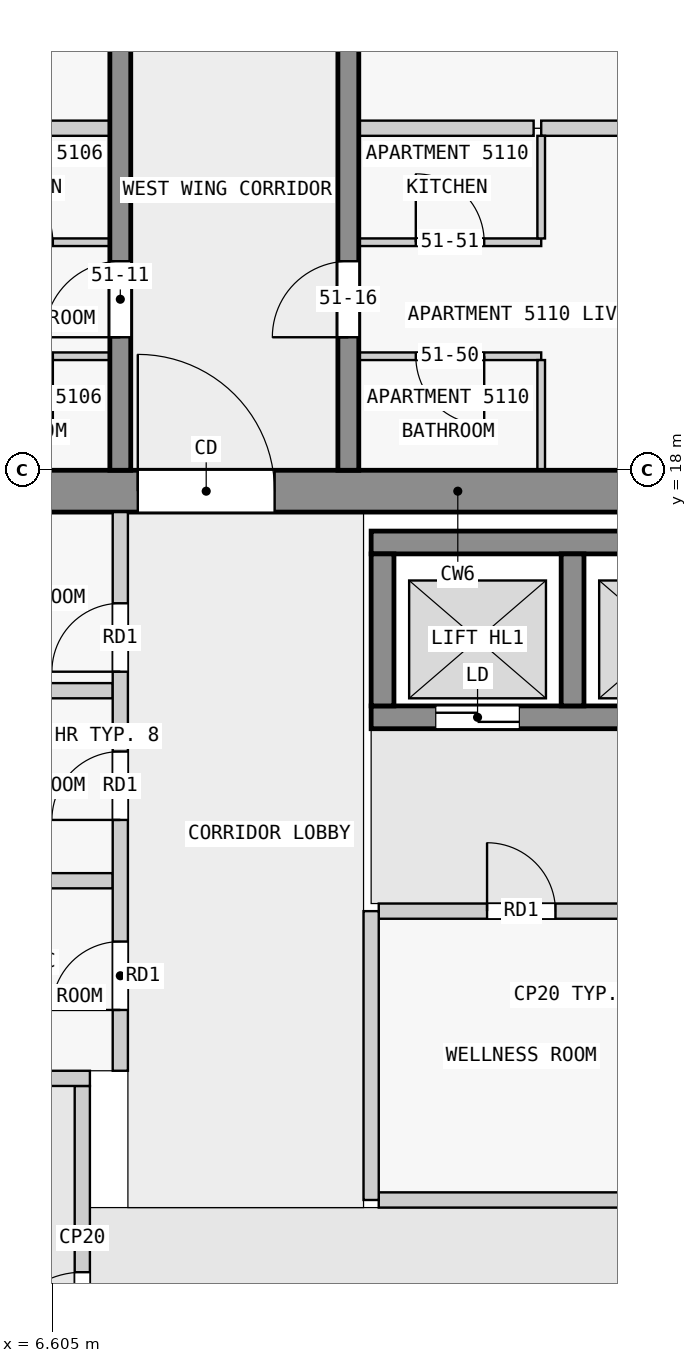
"""IFC4 building model, lengths in metres.
Left out: names, types, materials, properties, quantities, classifications, styles, units other than length and angle.
Written with IfcOpenShell. Run it as: python <this file> out.ifc"""

import sys

from ifc_helpers import new_model, si_unit, direction, frame, frame_2d, origin, place, context, subcontext, project, spatial, rectangle, extrude, element, fill, save


model = new_model("IFC4")
c1 = context("Model", 3, precision=1e-05, world=origin(), true_north=direction((0.0, 1.0)))
c2 = subcontext(c1, "Body", "Model", "MODEL_VIEW")
j1 = project(units=[si_unit("LENGTHUNIT", "METRE"), si_unit("PLANEANGLEUNIT", "RADIAN")], contexts=[c1])
p1 = place(None, origin())
s1 = spatial("IfcSite", under=j1, at=p1, CompositionType="ELEMENT")
p2 = place(p1, origin())
s2 = spatial("IfcBuilding", under=s1, at=p2, CompositionType="ELEMENT")
p3 = place(p2, frame((0.0, 0.0, 197.9)))
s3 = spatial("IfcBuildingStorey", under=s2, at=p3, CompositionType="ELEMENT", Elevation=197.9)
p4 = place(p3, frame((1.38, 17.725, 0.0), z_axis=(0.0, 0.0, 1.0), x_axis=(1.0, 0.0, 0.0)))
e1 = element("IfcWall", 1, at=p4, inside=s3, PredefinedType="SHEAR", context=c2, shape_type="SweptSolid", body=[
    extrude(rectangle(XDim=21.12, YDim=0.55, at=frame_2d((10.56, 0.0))), origin(), (0.0, 0.0, 1.0), 3.25),
])
p5 = place(p4, frame((6.35, 0.0, 0.0)))
e2 = element("IfcOpeningElement", 2, at=p5, cuts=e1, PredefinedType="OPENING", context=c2, shape_type="SweptSolid", body=[
    extrude(rectangle(XDim=1.8, YDim=2.1, at=frame_2d((0.9, 1.05))), frame((0.0, 0.285, 0.0), z_axis=(0.0, -1.0, 0.0), x_axis=(1.0, 0.0, 0.0)), (0.0, 0.0, 1.0), 0.57),
])
p6 = place(p3, frame((10.8, 17.05, 0.0), z_axis=(0.0, 0.0, 1.0), x_axis=(1.0, 0.0, 0.0)))
e3 = element("IfcWall", 3, at=p6, inside=s3, PredefinedType="SHEAR", context=c2, shape_type="SweptSolid", body=[
    extrude(rectangle(XDim=7.8, YDim=0.3, at=frame_2d((3.9, 0.0))), origin(), (0.0, 0.0, 1.0), 3.25),
])
p7 = place(p3, frame((10.8, 14.75, 0.0), z_axis=(0.0, 0.0, 1.0), x_axis=(1.0, 0.0, 0.0)))
e4 = element("IfcWall", 4, at=p7, inside=s3, PredefinedType="SHEAR", context=c2, shape_type="SweptSolid", body=[
    extrude(rectangle(XDim=7.8, YDim=0.3, at=frame_2d((3.9, 0.0))), origin(), (0.0, 0.0, 1.0), 3.25),
])
p8 = place(p7, frame((0.85, 0.0, 0.0)))
e5 = element("IfcOpeningElement", 5, at=p8, cuts=e4, PredefinedType="OPENING", context=c2, shape_type="SweptSolid", body=[
    extrude(rectangle(XDim=1.1, YDim=2.1, at=frame_2d((0.55, 1.05))), frame((0.0, 0.16, 0.0), z_axis=(0.0, -1.0, 0.0), x_axis=(1.0, 0.0, 0.0)), (0.0, 0.0, 1.0), 0.32),
])
p9 = place(p7, frame((3.35, 0.0, 0.0)))
e6 = element("IfcOpeningElement", 6, at=p9, cuts=e4, PredefinedType="OPENING", context=c2, shape_type="SweptSolid", body=[
    extrude(rectangle(XDim=1.1, YDim=2.1, at=frame_2d((0.55, 1.05))), frame((0.0, 0.16, 0.0), z_axis=(0.0, -1.0, 0.0), x_axis=(1.0, 0.0, 0.0)), (0.0, 0.0, 1.0), 0.32),
])
p10 = place(p7, frame((5.85, 0.0, 0.0)))
e7 = element("IfcOpeningElement", 7, at=p10, cuts=e4, PredefinedType="OPENING", context=c2, shape_type="SweptSolid", body=[
    extrude(rectangle(XDim=1.1, YDim=2.1, at=frame_2d((0.55, 1.05))), frame((0.0, 0.16, 0.0), z_axis=(0.0, -1.0, 0.0), x_axis=(1.0, 0.0, 0.0)), (0.0, 0.0, 1.0), 0.32),
])
for number, where, z_axis, x_axis in (
    (8, (10.95, 14.9, 0.0), (0.0, 0.0, 1.0), (0.0, 1.0, 0.0)),
    (9, (13.45, 14.9, 0.0), (0.0, 0.0, 1.0), (0.0, 1.0, 0.0)),
):
    element("IfcWall", number, at=place(p3, frame(where, z_axis=z_axis, x_axis=x_axis)), inside=s3, PredefinedType="SHEAR", context=c2, shape_type="SweptSolid", body=[
        extrude(rectangle(XDim=2.0, YDim=0.3, at=frame_2d((1.0, 0.0))), origin(), (0.0, 0.0, 1.0), 3.25),
    ])
p11 = place(p3, frame((7.5, 18.0, 0.0), z_axis=(0.0, 0.0, 1.0), x_axis=(0.0, 1.0, 0.0)))
e10 = element("IfcWall", 10, at=p11, inside=s3, PredefinedType="SHEAR", context=c2, shape_type="SweptSolid", body=[
    extrude(rectangle(XDim=27.0, YDim=0.275, at=frame_2d((13.5, 0.0))), origin(), (0.0, 0.0, 1.0), 3.25),
])
p12 = place(p11, frame((1.75, 0.0, 0.0)))
e11 = element("IfcOpeningElement", 11, at=p12, cuts=e10, PredefinedType="OPENING", context=c2, shape_type="SweptSolid", body=[
    extrude(rectangle(XDim=1.0, YDim=2.1, at=frame_2d((0.5, 1.05))), frame((0.0, 0.147, 0.0), z_axis=(0.0, -1.0, 0.0), x_axis=(1.0, 0.0, 0.0)), (0.0, 0.0, 1.0), 0.295),
])
p13 = place(p11, frame((5.85, 0.0, 0.0)))
e12 = element("IfcOpeningElement", 12, at=p13, cuts=e10, PredefinedType="OPENING", context=c2, shape_type="SweptSolid", body=[
    extrude(rectangle(XDim=1.8, YDim=2.1, at=frame_2d((0.9, 1.05))), frame((0.0, 0.147, 0.0), z_axis=(0.0, -1.0, 0.0), x_axis=(1.0, 0.0, 0.0)), (0.0, 0.0, 1.0), 0.295),
])
p14 = place(p11, frame((10.75, 0.0, 0.0)))
e13 = element("IfcOpeningElement", 13, at=p14, cuts=e10, PredefinedType="OPENING", context=c2, shape_type="SweptSolid", body=[
    extrude(rectangle(XDim=1.0, YDim=2.1, at=frame_2d((0.5, 1.05))), frame((0.0, 0.147, 0.0), z_axis=(0.0, -1.0, 0.0), x_axis=(1.0, 0.0, 0.0)), (0.0, 0.0, 1.0), 0.295),
])
p15 = place(p11, frame((15.25, 0.0, 0.0)))
e14 = element("IfcOpeningElement", 14, at=p15, cuts=e10, PredefinedType="OPENING", context=c2, shape_type="SweptSolid", body=[
    extrude(rectangle(XDim=1.0, YDim=2.1, at=frame_2d((0.5, 1.05))), frame((0.0, 0.147, 0.0), z_axis=(0.0, -1.0, 0.0), x_axis=(1.0, 0.0, 0.0)), (0.0, 0.0, 1.0), 0.295),
])
p16 = place(p11, frame((21.35, 0.0, 0.0)))
e15 = element("IfcOpeningElement", 15, at=p16, cuts=e10, PredefinedType="OPENING", context=c2, shape_type="SweptSolid", body=[
    extrude(rectangle(XDim=1.0, YDim=2.1, at=frame_2d((0.5, 1.05))), frame((0.0, 0.147, 0.0), z_axis=(0.0, -1.0, 0.0), x_axis=(1.0, 0.0, 0.0)), (0.0, 0.0, 1.0), 0.295),
])
p17 = place(p3, frame((10.5, 18.0, 0.0), z_axis=(0.0, 0.0, 1.0), x_axis=(0.0, 1.0, 0.0)))
e16 = element("IfcWall", 16, at=p17, inside=s3, PredefinedType="SHEAR", context=c2, shape_type="SweptSolid", body=[
    extrude(rectangle(XDim=27.0, YDim=0.275, at=frame_2d((13.5, 0.0))), origin(), (0.0, 0.0, 1.0), 3.25),
])
p18 = place(p17, frame((1.75, 0.0, 0.0)))
e17 = element("IfcOpeningElement", 17, at=p18, cuts=e16, PredefinedType="OPENING", context=c2, shape_type="SweptSolid", body=[
    extrude(rectangle(XDim=1.0, YDim=2.1, at=frame_2d((0.5, 1.05))), frame((0.0, 0.147, 0.0), z_axis=(0.0, -1.0, 0.0), x_axis=(1.0, 0.0, 0.0)), (0.0, 0.0, 1.0), 0.295),
])
p19 = place(p17, frame((6.25, 0.0, 0.0)))
e18 = element("IfcOpeningElement", 18, at=p19, cuts=e16, PredefinedType="OPENING", context=c2, shape_type="SweptSolid", body=[
    extrude(rectangle(XDim=1.0, YDim=2.1, at=frame_2d((0.5, 1.05))), frame((0.0, 0.147, 0.0), z_axis=(0.0, -1.0, 0.0), x_axis=(1.0, 0.0, 0.0)), (0.0, 0.0, 1.0), 0.295),
])
p20 = place(p17, frame((15.25, 0.0, 0.0)))
e19 = element("IfcOpeningElement", 19, at=p20, cuts=e16, PredefinedType="OPENING", context=c2, shape_type="SweptSolid", body=[
    extrude(rectangle(XDim=1.0, YDim=2.1, at=frame_2d((0.5, 1.05))), frame((0.0, 0.147, 0.0), z_axis=(0.0, -1.0, 0.0), x_axis=(1.0, 0.0, 0.0)), (0.0, 0.0, 1.0), 0.295),
])
p21 = place(p17, frame((19.75, 0.0, 0.0)))
e20 = element("IfcOpeningElement", 20, at=p21, cuts=e16, PredefinedType="OPENING", context=c2, shape_type="SweptSolid", body=[
    extrude(rectangle(XDim=1.0, YDim=2.1, at=frame_2d((0.5, 1.05))), frame((0.0, 0.147, 0.0), z_axis=(0.0, -1.0, 0.0), x_axis=(1.0, 0.0, 0.0)), (0.0, 0.0, 1.0), 0.295),
])
p22 = place(p17, frame((23.25, 0.0, 0.0)))
e21 = element("IfcOpeningElement", 21, at=p22, cuts=e16, PredefinedType="OPENING", context=c2, shape_type="SweptSolid", body=[
    extrude(rectangle(XDim=0.9, YDim=2.1, at=frame_2d((0.45, 1.05))), frame((0.0, 0.147, 0.0), z_axis=(0.0, -1.0, 0.0), x_axis=(1.0, 0.0, 0.0)), (0.0, 0.0, 1.0), 0.295),
])
p23 = place(p17, frame((25.45, 0.0, 0.0)))
e22 = element("IfcOpeningElement", 22, at=p23, cuts=e16, PredefinedType="OPENING", context=c2, shape_type="SweptSolid", body=[
    extrude(rectangle(XDim=1.0, YDim=2.1, at=frame_2d((0.5, 1.05))), frame((0.0, 0.147, 0.0), z_axis=(0.0, -1.0, 0.0), x_axis=(1.0, 0.0, 0.0)), (0.0, 0.0, 1.0), 0.295),
])
p24 = place(p3, frame((7.0, 5.9, 0.0), z_axis=(0.0, 0.0, 1.0), x_axis=(0.0, 1.0, 0.0)))
e23 = element("IfcWall", 23, at=p24, inside=s3, PredefinedType="PARTITIONING", context=c2, shape_type="SweptSolid", body=[
    extrude(rectangle(XDim=4.0, YDim=0.2, at=frame_2d((2.0, 0.0))), origin(), (0.0, 0.0, 1.0), 3.25),
])
p25 = place(p24, frame((0.45, 0.0, 0.0)))
e24 = element("IfcOpeningElement", 24, at=p25, cuts=e23, PredefinedType="OPENING", context=c2, shape_type="SweptSolid", body=[
    extrude(rectangle(XDim=1.1, YDim=2.1, at=frame_2d((0.55, 1.05))), frame((0.0, 0.11, 0.0), z_axis=(0.0, -1.0, 0.0), x_axis=(1.0, 0.0, 0.0)), (0.0, 0.0, 1.0), 0.22),
])
p26 = place(p3, frame((5.15, 10.0, 0.0), z_axis=(0.0, 0.0, 1.0), x_axis=(1.0, 0.0, 0.0)))
e25 = element("IfcWall", 25, at=p26, inside=s3, PredefinedType="PARTITIONING", context=c2, shape_type="SweptSolid", body=[
    extrude(rectangle(XDim=1.95, YDim=0.2, at=frame_2d((0.975, 0.0))), origin(), (0.0, 0.0, 1.0), 3.25),
])
p27 = place(p3, frame((10.8, 8.4, 0.0), z_axis=(0.0, 0.0, 1.0), x_axis=(0.0, 1.0, 0.0)))
e26 = element("IfcWall", 26, at=p27, inside=s3, PredefinedType="PARTITIONING", context=c2, shape_type="SweptSolid", body=[
    extrude(rectangle(XDim=3.8, YDim=0.2, at=frame_2d((1.9, 0.0))), origin(), (0.0, 0.0, 1.0), 3.25),
])
p28 = place(p3, frame((10.9, 8.4, 0.0), z_axis=(0.0, 0.0, 1.0), x_axis=(1.0, 0.0, 0.0)))
e27 = element("IfcWall", 27, at=p28, inside=s3, PredefinedType="PARTITIONING", context=c2, shape_type="SweptSolid", body=[
    extrude(rectangle(XDim=8.55, YDim=0.2, at=frame_2d((4.275, 0.0))), origin(), (0.0, 0.0, 1.0), 3.25),
])
p29 = place(p3, frame((10.9, 12.2, 0.0), z_axis=(0.0, 0.0, 1.0), x_axis=(1.0, 0.0, 0.0)))
e28 = element("IfcWall", 28, at=p29, inside=s3, PredefinedType="PARTITIONING", context=c2, shape_type="SweptSolid", body=[
    extrude(rectangle(XDim=8.55, YDim=0.2, at=frame_2d((4.275, 0.0))), origin(), (0.0, 0.0, 1.0), 3.25),
])
p30 = place(p29, frame((1.425, 0.0, 0.0)))
e29 = element("IfcOpeningElement", 29, at=p30, cuts=e28, PredefinedType="OPENING", context=c2, shape_type="SweptSolid", body=[
    extrude(rectangle(XDim=0.9, YDim=2.1, at=frame_2d((0.45, 1.05))), frame((0.0, 0.11, 0.0), z_axis=(0.0, -1.0, 0.0), x_axis=(1.0, 0.0, 0.0)), (0.0, 0.0, 1.0), 0.22),
])
p31 = place(p29, frame((5.8, 0.0, 0.0)))
e30 = element("IfcOpeningElement", 30, at=p31, cuts=e28, PredefinedType="OPENING", context=c2, shape_type="SweptSolid", body=[
    extrude(rectangle(XDim=0.9, YDim=2.1, at=frame_2d((0.45, 1.05))), frame((0.0, 0.11, 0.0), z_axis=(0.0, -1.0, 0.0), x_axis=(1.0, 0.0, 0.0)), (0.0, 0.0, 1.0), 0.22),
])
p32 = place(p3, frame((7.5, 10.1, 0.0), z_axis=(0.0, 0.0, 1.0), x_axis=(0.0, 1.0, 0.0)))
e31 = element("IfcWall", 31, at=p32, inside=s3, PredefinedType="PARTITIONING", context=c2, shape_type="SweptSolid", body=[
    extrude(rectangle(XDim=7.35, YDim=0.2, at=frame_2d((3.675, 0.0))), origin(), (0.0, 0.0, 1.0), 3.25),
])
p33 = place(p32, frame((0.8, 0.0, 0.0)))
e32 = element("IfcOpeningElement", 32, at=p33, cuts=e31, PredefinedType="OPENING", context=c2, shape_type="SweptSolid", body=[
    extrude(rectangle(XDim=0.9, YDim=2.1, at=frame_2d((0.45, 1.05))), frame((0.0, 0.11, 0.0), z_axis=(0.0, -1.0, 0.0), x_axis=(1.0, 0.0, 0.0)), (0.0, 0.0, 1.0), 0.22),
])
p34 = place(p32, frame((3.3, 0.0, 0.0)))
e33 = element("IfcOpeningElement", 33, at=p34, cuts=e31, PredefinedType="OPENING", context=c2, shape_type="SweptSolid", body=[
    extrude(rectangle(XDim=0.9, YDim=2.1, at=frame_2d((0.45, 1.05))), frame((0.0, 0.11, 0.0), z_axis=(0.0, -1.0, 0.0), x_axis=(1.0, 0.0, 0.0)), (0.0, 0.0, 1.0), 0.22),
])
p35 = place(p32, frame((5.25, 0.0, 0.0)))
e34 = element("IfcOpeningElement", 34, at=p35, cuts=e31, PredefinedType="OPENING", context=c2, shape_type="SweptSolid", body=[
    extrude(rectangle(XDim=0.9, YDim=2.1, at=frame_2d((0.45, 1.05))), frame((0.0, 0.11, 0.0), z_axis=(0.0, -1.0, 0.0), x_axis=(1.0, 0.0, 0.0)), (0.0, 0.0, 1.0), 0.22),
])
for number, where, z_axis, x_axis in (
    (35, (5.15, 12.6, 0.0), (0.0, 0.0, 1.0), (1.0, 0.0, 0.0)),
    (36, (5.15, 15.1, 0.0), (0.0, 0.0, 1.0), (1.0, 0.0, 0.0)),
):
    element("IfcWall", number, at=place(p3, frame(where, z_axis=z_axis, x_axis=x_axis)), inside=s3, PredefinedType="PARTITIONING", context=c2, shape_type="SweptSolid", body=[
        extrude(rectangle(XDim=2.25, YDim=0.2, at=frame_2d((1.125, 0.0))), origin(), (0.0, 0.0, 1.0), 3.25),
    ])
p36 = place(p3, frame((7.363, 19.5, 0.0), z_axis=(0.0, 0.0, 1.0), x_axis=(-1.0, 0.0, 0.0)))
e37 = element("IfcWall", 37, at=p36, inside=s3, PredefinedType="PARTITIONING", context=c2, shape_type="SweptSolid", body=[
    extrude(rectangle(XDim=2.4, YDim=0.1, at=frame_2d((1.2, 0.0))), origin(), (0.0, 0.0, 1.0), 3.25),
])
p37 = place(p36, frame((0.75, 0.0, 0.0)))
e38 = element("IfcOpeningElement", 38, at=p37, cuts=e37, PredefinedType="OPENING", context=c2, shape_type="SweptSolid", body=[
    extrude(rectangle(XDim=0.9, YDim=2.1, at=frame_2d((0.45, 1.05))), frame((0.0, 0.06, 0.0), z_axis=(0.0, -1.0, 0.0), x_axis=(1.0, 0.0, 0.0)), (0.0, 0.0, 1.0), 0.12),
])
p38 = place(p3, frame((13.038, 19.5, 0.0), z_axis=(0.0, 0.0, 1.0), x_axis=(-1.0, 0.0, 0.0)))
e39 = element("IfcWall", 39, at=p38, inside=s3, PredefinedType="PARTITIONING", context=c2, shape_type="SweptSolid", body=[
    extrude(rectangle(XDim=2.4, YDim=0.1, at=frame_2d((1.2, 0.0))), origin(), (0.0, 0.0, 1.0), 3.25),
])
p39 = place(p38, frame((0.75, 0.0, 0.0)))
e40 = element("IfcOpeningElement", 40, at=p39, cuts=e39, PredefinedType="OPENING", context=c2, shape_type="SweptSolid", body=[
    extrude(rectangle(XDim=0.9, YDim=2.1, at=frame_2d((0.45, 1.05))), frame((0.0, 0.06, 0.0), z_axis=(0.0, -1.0, 0.0), x_axis=(1.0, 0.0, 0.0)), (0.0, 0.0, 1.0), 0.12),
])
p40 = place(p3, frame((4.962, 21.0, 0.0), z_axis=(0.0, 0.0, 1.0), x_axis=(1.0, 0.0, 0.0)))
e41 = element("IfcWall", 41, at=p40, inside=s3, PredefinedType="PARTITIONING", context=c2, shape_type="SweptSolid", body=[
    extrude(rectangle(XDim=2.4, YDim=0.1, at=frame_2d((1.2, 0.0))), origin(), (0.0, 0.0, 1.0), 3.25),
])
p41 = place(p40, frame((0.75, 0.0, 0.0)))
e42 = element("IfcOpeningElement", 42, at=p41, cuts=e41, PredefinedType="OPENING", context=c2, shape_type="SweptSolid", body=[
    extrude(rectangle(XDim=0.9, YDim=2.1, at=frame_2d((0.45, 1.05))), frame((0.0, 0.06, 0.0), z_axis=(0.0, -1.0, 0.0), x_axis=(1.0, 0.0, 0.0)), (0.0, 0.0, 1.0), 0.12),
])
p42 = place(p3, frame((10.637, 21.0, 0.0), z_axis=(0.0, 0.0, 1.0), x_axis=(1.0, 0.0, 0.0)))
e43 = element("IfcWall", 43, at=p42, inside=s3, PredefinedType="PARTITIONING", context=c2, shape_type="SweptSolid", body=[
    extrude(rectangle(XDim=2.4, YDim=0.1, at=frame_2d((1.2, 0.0))), origin(), (0.0, 0.0, 1.0), 3.25),
])
p43 = place(p42, frame((0.75, 0.0, 0.0)))
e44 = element("IfcOpeningElement", 44, at=p43, cuts=e43, PredefinedType="OPENING", context=c2, shape_type="SweptSolid", body=[
    extrude(rectangle(XDim=0.9, YDim=2.1, at=frame_2d((0.45, 1.05))), frame((0.0, 0.06, 0.0), z_axis=(0.0, -1.0, 0.0), x_axis=(1.0, 0.0, 0.0)), (0.0, 0.0, 1.0), 0.12),
])
for number, where, z_axis, x_axis in (
    (45, (7.363, 22.5, 0.0), (0.0, 0.0, 1.0), (-1.0, 0.0, 0.0)),
    (46, (12.938, 22.5, 0.0), (0.0, 0.0, 1.0), (-1.0, 0.0, 0.0)),
):
    element("IfcWall", number, at=place(p3, frame(where, z_axis=z_axis, x_axis=x_axis)), inside=s3, PredefinedType="PARTITIONING", context=c2, shape_type="SweptSolid", body=[
        extrude(rectangle(XDim=2.3, YDim=0.2, at=frame_2d((1.15, 0.0))), origin(), (0.0, 0.0, 1.0), 3.25),
    ])
p44 = place(p3, frame((13.038, 22.5, 0.0), z_axis=(0.0, 0.0, 1.0), x_axis=(1.0, 0.0, 0.0)))
e47 = element("IfcWall", 47, at=p44, inside=s3, PredefinedType="PARTITIONING", context=c2, shape_type="SweptSolid", body=[
    extrude(rectangle(XDim=5.042, YDim=0.2, at=frame_2d((2.521, 0.0))), origin(), (0.0, 0.0, 1.0), 3.25),
])
p45 = place(p3, frame((13.038, 18.0, 0.0), z_axis=(0.0, 0.0, 1.0), x_axis=(0.0, 1.0, 0.0)))
e48 = element("IfcWall", 48, at=p45, inside=s3, PredefinedType="PARTITIONING", context=c2, shape_type="SweptSolid", body=[
    extrude(rectangle(XDim=1.45, YDim=0.1, at=frame_2d((0.725, 0.0))), origin(), (0.0, 0.0, 1.0), 3.25),
])
p46 = place(p3, frame((13.038, 21.05, 0.0), z_axis=(0.0, 0.0, 1.0), x_axis=(0.0, 1.0, 0.0)))
e49 = element("IfcWall", 49, at=p46, inside=s3, PredefinedType="PARTITIONING", context=c2, shape_type="SweptSolid", body=[
    extrude(rectangle(XDim=1.35, YDim=0.1, at=frame_2d((0.675, 0.0))), origin(), (0.0, 0.0, 1.0), 3.25),
])
p47 = place(p25, origin())
e50 = element("IfcDoor", 50, at=p47, inside=s3, OperationType="SINGLE_SWING_LEFT", PredefinedType="DOOR", context=c2, shape_type="SweptSolid", body=[
    extrude(rectangle(XDim=1.1, YDim=2.1, at=frame_2d((0.55, 1.05))), frame((0.0, 0.025, 0.0), z_axis=(0.0, -1.0, 0.0), x_axis=(1.0, 0.0, 0.0)), (0.0, 0.0, 1.0), 0.05),
])
fill(e24, e50)
p48 = place(p30, origin())
e51 = element("IfcDoor", 51, at=p48, inside=s3, OperationType="SINGLE_SWING_LEFT", PredefinedType="DOOR", context=c2, shape_type="SweptSolid", body=[
    extrude(rectangle(XDim=0.9, YDim=2.1, at=frame_2d((0.45, 1.05))), frame((0.0, 0.025, 0.0), z_axis=(0.0, -1.0, 0.0), x_axis=(1.0, 0.0, 0.0)), (0.0, 0.0, 1.0), 0.05),
])
fill(e29, e51)
p49 = place(p8, origin())
e52 = element("IfcDoor", 52, at=p49, inside=s3, OperationType="DOUBLE_DOOR_SLIDING", PredefinedType="DOOR", context=c2, shape_type="SweptSolid", body=[
    extrude(rectangle(XDim=1.1, YDim=2.1, at=frame_2d((0.55, 1.05))), frame((0.0, 0.025, 0.0), z_axis=(0.0, -1.0, 0.0), x_axis=(1.0, 0.0, 0.0)), (0.0, 0.0, 1.0), 0.05),
])
fill(e5, e52)
p50 = place(p5, origin())
e53 = element("IfcDoor", 53, at=p50, inside=s3, OperationType="DOUBLE_DOOR_SINGLE_SWING", PredefinedType="DOOR", context=c2, shape_type="SweptSolid", body=[
    extrude(rectangle(XDim=1.8, YDim=2.1, at=frame_2d((0.9, 1.05))), frame((0.0, 0.025, 0.0), z_axis=(0.0, -1.0, 0.0), x_axis=(1.0, 0.0, 0.0)), (0.0, 0.0, 1.0), 0.05),
])
fill(e2, e53)
p51 = place(p33, origin())
e54 = element("IfcDoor", 54, at=p51, inside=s3, OperationType="SINGLE_SWING_RIGHT", PredefinedType="DOOR", context=c2, shape_type="SweptSolid", body=[
    extrude(rectangle(XDim=0.9, YDim=2.1, at=frame_2d((0.45, 1.05))), frame((0.0, 0.025, 0.0), z_axis=(0.0, -1.0, 0.0), x_axis=(1.0, 0.0, 0.0)), (0.0, 0.0, 1.0), 0.05),
])
fill(e32, e54)
p52 = place(p34, origin())
e55 = element("IfcDoor", 55, at=p52, inside=s3, OperationType="SINGLE_SWING_RIGHT", PredefinedType="DOOR", context=c2, shape_type="SweptSolid", body=[
    extrude(rectangle(XDim=0.9, YDim=2.1, at=frame_2d((0.45, 1.05))), frame((0.0, 0.025, 0.0), z_axis=(0.0, -1.0, 0.0), x_axis=(1.0, 0.0, 0.0)), (0.0, 0.0, 1.0), 0.05),
])
fill(e33, e55)
p53 = place(p35, origin())
e56 = element("IfcDoor", 56, at=p53, inside=s3, OperationType="SINGLE_SWING_RIGHT", PredefinedType="DOOR", context=c2, shape_type="SweptSolid", body=[
    extrude(rectangle(XDim=0.9, YDim=2.1, at=frame_2d((0.45, 1.05))), frame((0.0, 0.025, 0.0), z_axis=(0.0, -1.0, 0.0), x_axis=(1.0, 0.0, 0.0)), (0.0, 0.0, 1.0), 0.05),
])
fill(e34, e56)
p54 = place(p12, origin())
e57 = element("IfcDoor", 57, at=p54, inside=s3, OperationType="SINGLE_SWING_LEFT", PredefinedType="DOOR", context=c2, shape_type="SweptSolid", body=[
    extrude(rectangle(XDim=1.0, YDim=2.1, at=frame_2d((0.5, 1.05))), frame((0.0, 0.025, 0.0), z_axis=(0.0, -1.0, 0.0), x_axis=(1.0, 0.0, 0.0)), (0.0, 0.0, 1.0), 0.05),
])
fill(e11, e57)
p55 = place(p18, origin())
e58 = element("IfcDoor", 58, at=p55, inside=s3, OperationType="SINGLE_SWING_LEFT", PredefinedType="DOOR", context=c2, shape_type="SweptSolid", body=[
    extrude(rectangle(XDim=1.0, YDim=2.1, at=frame_2d((0.5, 1.05))), frame((0.0, 0.025, 0.0), z_axis=(0.0, -1.0, 0.0), x_axis=(1.0, 0.0, 0.0)), (0.0, 0.0, 1.0), 0.05),
])
fill(e17, e58)
p56 = place(p37, origin())
e59 = element("IfcDoor", 59, at=p56, inside=s3, OperationType="SINGLE_SWING_RIGHT", PredefinedType="DOOR", context=c2, shape_type="SweptSolid", body=[
    extrude(rectangle(XDim=0.9, YDim=2.1, at=frame_2d((0.45, 1.05))), frame((0.0, 0.025, 0.0), z_axis=(0.0, -1.0, 0.0), x_axis=(1.0, 0.0, 0.0)), (0.0, 0.0, 1.0), 0.05),
])
fill(e38, e59)
p57 = place(p41, origin())
e60 = element("IfcDoor", 60, at=p57, inside=s3, OperationType="SINGLE_SWING_RIGHT", PredefinedType="DOOR", context=c2, shape_type="SweptSolid", body=[
    extrude(rectangle(XDim=0.9, YDim=2.1, at=frame_2d((0.45, 1.05))), frame((0.0, 0.025, 0.0), z_axis=(0.0, -1.0, 0.0), x_axis=(1.0, 0.0, 0.0)), (0.0, 0.0, 1.0), 0.05),
])
fill(e42, e60)
p58 = place(p39, origin())
e61 = element("IfcDoor", 61, at=p58, inside=s3, OperationType="SINGLE_SWING_LEFT", PredefinedType="DOOR", context=c2, shape_type="SweptSolid", body=[
    extrude(rectangle(XDim=0.9, YDim=2.1, at=frame_2d((0.45, 1.05))), frame((0.0, 0.025, 0.0), z_axis=(0.0, -1.0, 0.0), x_axis=(1.0, 0.0, 0.0)), (0.0, 0.0, 1.0), 0.05),
])
fill(e40, e61)
p59 = place(p43, origin())
e62 = element("IfcDoor", 62, at=p59, inside=s3, OperationType="SINGLE_SWING_LEFT", PredefinedType="DOOR", context=c2, shape_type="SweptSolid", body=[
    extrude(rectangle(XDim=0.9, YDim=2.1, at=frame_2d((0.45, 1.05))), frame((0.0, 0.025, 0.0), z_axis=(0.0, -1.0, 0.0), x_axis=(1.0, 0.0, 0.0)), (0.0, 0.0, 1.0), 0.05),
])
fill(e44, e62)
save(model, sys.argv[1])
